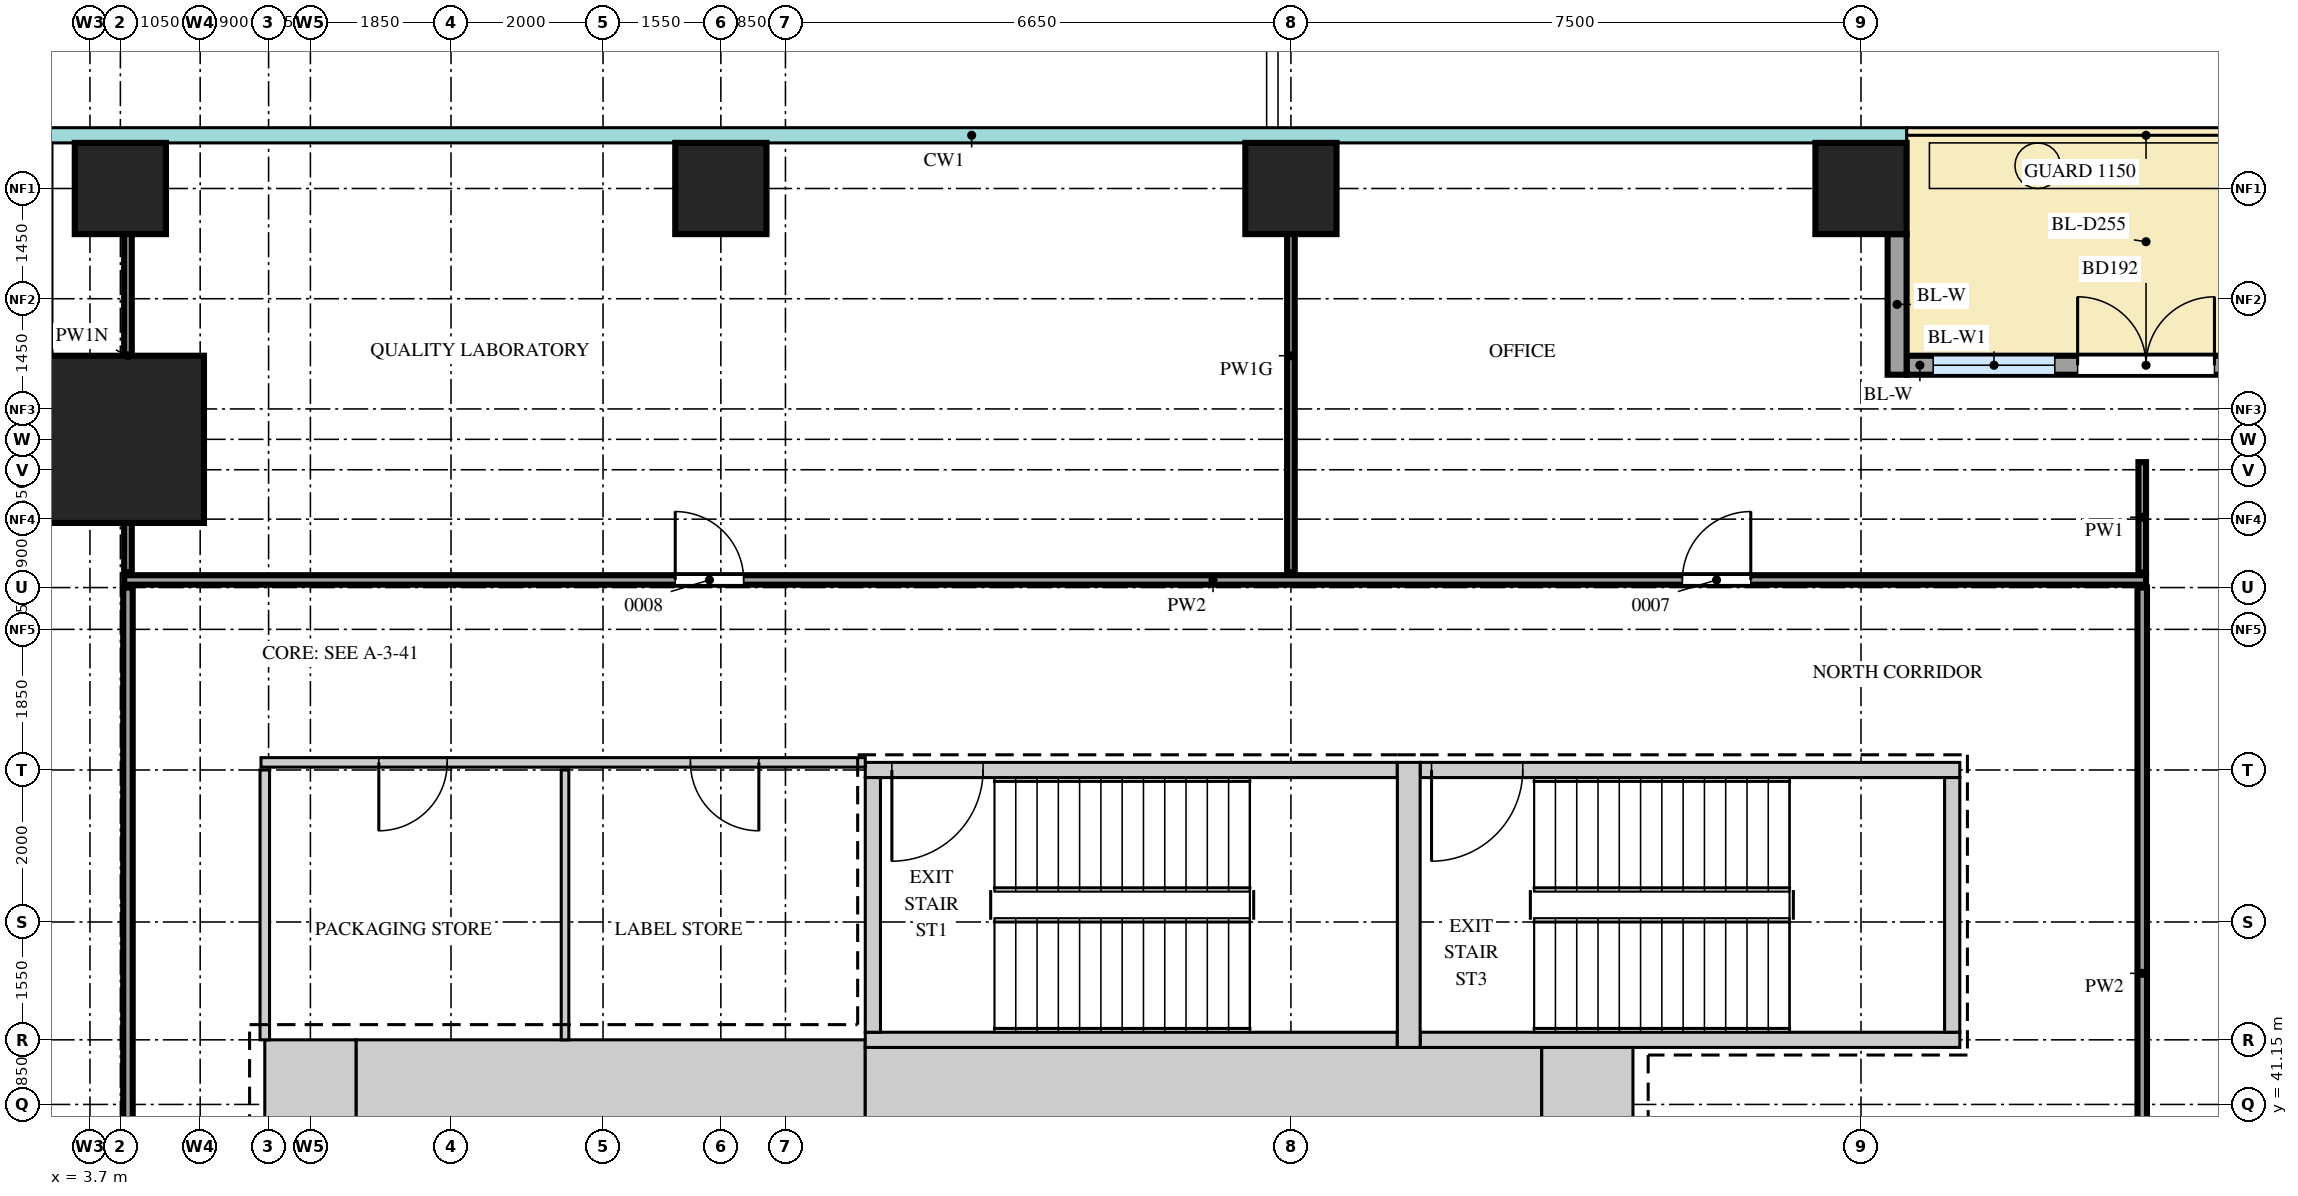
"""IFC4 building model, lengths in metres.
Left out: names, types, materials, properties, quantities, classifications, styles, units other than length and angle.
Written with IfcOpenShell. Run it as: python <this file> out.ifc"""

import sys

from ifc_helpers import new_model, si_unit, direction, frame, frame_2d, origin, origin_2d, place, context, subcontext, project, spatial, rectangle, extrude, source, transform, mapped, element, fill, save


model = new_model("IFC4")
c1 = context("Model", 3, precision=1e-05, world=origin(), true_north=direction((0.0, 1.0)))
c2 = subcontext(c1, "Body", "Model", "MODEL_VIEW")
j1 = project(units=[si_unit("LENGTHUNIT", "METRE"), si_unit("PLANEANGLEUNIT", "RADIAN")], contexts=[c1])
p1 = place(None, origin())
s1 = spatial("IfcSite", under=j1, at=p1, CompositionType="ELEMENT")
p2 = place(p1, origin())
s2 = spatial("IfcBuilding", under=s1, at=p2, CompositionType="ELEMENT")
p3 = place(p2, frame((0.0, 0.0, 91.5)))
s3 = spatial("IfcBuildingStorey", under=s2, at=p3, CompositionType="ELEMENT", Elevation=91.5)
m1 = source(origin(), c2, "Body", "SweptSolid", [
    extrude(rectangle(XDim=6.7, YDim=1.2, at=frame_2d((3.35, 0.0))), origin(), (0.0, 0.0, 1.0), 4.2),
])
p4 = place(p3, frame((7.2, 41.4, 0.0), z_axis=(0.0, 0.0, 1.0), x_axis=(1.0, 0.0, 0.0)))
e1 = element("IfcWall", 1, at=p4, inside=s3, PredefinedType="SHEAR", context=c2, shape_type="MappedRepresentation", body=[
    mapped(m1, transform((0.0, 0.0, 0.0))),
])
m2 = source(origin(), c2, "Body", "SweptSolid", [
    extrude(rectangle(XDim=8.9, YDim=1.1, at=frame_2d((4.45, 0.0))), origin(), (0.0, 0.0, 1.0), 4.2),
])
p5 = place(p3, frame((13.9, 41.35, 0.0), z_axis=(0.0, 0.0, 1.0), x_axis=(1.0, 0.0, 0.0)))
e2 = element("IfcWall", 2, at=p5, inside=s3, PredefinedType="SHEAR", context=c2, shape_type="MappedRepresentation", body=[
    mapped(m2, transform((0.0, 0.0, 0.0))),
])
m3 = source(origin(), c2, "Body", "SweptSolid", [
    extrude(rectangle(XDim=1.2, YDim=1.1, at=frame_2d((0.6, 0.0))), origin(), (0.0, 0.0, 1.0), 4.2),
])
p6 = place(p3, frame((22.8, 41.35, 0.0), z_axis=(0.0, 0.0, 1.0), x_axis=(1.0, 0.0, 0.0)))
e3 = element("IfcWall", 3, at=p6, inside=s3, PredefinedType="SHEAR", context=c2, shape_type="MappedRepresentation", body=[
    mapped(m3, transform((0.0, 0.0, 0.0))),
])
m4 = source(origin(), c2, "Body", "SweptSolid", [
    extrude(rectangle(XDim=1.2, YDim=1.2, at=frame_2d((0.6, 0.0))), origin(), (0.0, 0.0, 1.0), 4.2),
])
p7 = place(p3, frame((6.0, 41.4, 0.0), z_axis=(0.0, 0.0, 1.0), x_axis=(1.0, 0.0, 0.0)))
e4 = element("IfcWall", 4, at=p7, inside=s3, PredefinedType="SHEAR", context=c2, shape_type="MappedRepresentation", body=[
    mapped(m4, transform((0.0, 0.0, 0.0))),
])
m5 = source(origin(), c2, "Body", "SweptSolid", [
    extrude(rectangle(XDim=7.0, YDim=0.2, at=frame_2d((3.5, 0.0))), origin(), (0.0, 0.0, 1.0), 4.2),
])
p8 = place(p3, frame((13.9, 45.55, 0.0), z_axis=(0.0, 0.0, 1.0), x_axis=(1.0, 0.0, 0.0)))
e5 = element("IfcWall", 5, at=p8, inside=s3, PredefinedType="SHEAR", context=c2, shape_type="MappedRepresentation", body=[
    mapped(m5, transform((0.0, 0.0, 0.0))),
])
m6 = source(origin(), c2, "Body", "SweptSolid", [
    extrude(rectangle(XDim=1.2, YDim=2.1, at=frame_2d((0.6, 1.05))), frame((0.0, 0.11, 0.0), z_axis=(0.0, -1.0, 0.0), x_axis=(1.0, 0.0, 0.0)), (0.0, 0.0, 1.0), 0.22),
])
p9 = place(p8, frame((0.35, 0.0, 0.0)))
e6 = element("IfcOpeningElement", 6, at=p9, cuts=e5, PredefinedType="OPENING", context=c2, shape_type="MappedRepresentation", body=[
    mapped(m6, transform((0.0, 0.0, 0.0))),
])
p10 = place(p3, frame((13.9, 42.0, 0.0), z_axis=(0.0, 0.0, 1.0), x_axis=(1.0, 0.0, 0.0)))
e7 = element("IfcWall", 7, at=p10, inside=s3, PredefinedType="SHEAR", context=c2, shape_type="MappedRepresentation", body=[
    mapped(m5, transform((0.0, 0.0, 0.0))),
])
m7 = source(origin(), c2, "Body", "SweptSolid", [
    extrude(rectangle(XDim=7.1, YDim=0.2, at=frame_2d((3.55, 0.0))), origin(), (0.0, 0.0, 1.0), 4.2),
])
p11 = place(p3, frame((21.2, 45.55, 0.0), z_axis=(0.0, 0.0, 1.0), x_axis=(1.0, 0.0, 0.0)))
e8 = element("IfcWall", 8, at=p11, inside=s3, PredefinedType="SHEAR", context=c2, shape_type="MappedRepresentation", body=[
    mapped(m7, transform((0.0, 0.0, 0.0))),
])
p12 = place(p11, frame((0.15, 0.0, 0.0)))
e9 = element("IfcOpeningElement", 9, at=p12, cuts=e8, PredefinedType="OPENING", context=c2, shape_type="MappedRepresentation", body=[
    mapped(m6, transform((0.0, 0.0, 0.0))),
])
p13 = place(p3, frame((21.2, 42.0, 0.0), z_axis=(0.0, 0.0, 1.0), x_axis=(1.0, 0.0, 0.0)))
e10 = element("IfcWall", 10, at=p13, inside=s3, PredefinedType="SHEAR", context=c2, shape_type="MappedRepresentation", body=[
    mapped(m7, transform((0.0, 0.0, 0.0))),
])
m8 = source(origin(), c2, "Body", "SweptSolid", [
    extrude(rectangle(XDim=3.75, YDim=0.3, at=frame_2d((1.875, 0.0))), origin(), (0.0, 0.0, 1.0), 4.2),
])
p14 = place(p3, frame((21.05, 41.9, 0.0), z_axis=(0.0, 0.0, 1.0), x_axis=(0.0, 1.0, 0.0)))
e11 = element("IfcWall", 11, at=p14, inside=s3, PredefinedType="SHEAR", context=c2, shape_type="MappedRepresentation", body=[
    mapped(m8, transform((0.0, 0.0, 0.0))),
])
m9 = source(origin(), c2, "Body", "SweptSolid", [
    extrude(rectangle(XDim=3.35, YDim=0.2, at=frame_2d((1.675, 0.0))), origin(), (0.0, 0.0, 1.0), 4.2),
])
for number, where, z_axis, x_axis in (
    (12, (14.0, 42.1, 0.0), (0.0, 0.0, 1.0), (0.0, 1.0, 0.0)),
    (13, (28.2, 42.1, 0.0), (0.0, 0.0, 1.0), (0.0, 1.0, 0.0)),
):
    element("IfcWall", number, at=place(p3, frame(where, z_axis=z_axis, x_axis=x_axis)), inside=s3, PredefinedType="SHEAR", context=c2, shape_type="MappedRepresentation", body=[
        mapped(m9, transform((0.0, 0.0, 0.0))),
    ])
m10 = source(origin(), c2, "Body", "SweptSolid", [
    extrude(rectangle(XDim=2.2, YDim=2.2, at=origin_2d()), origin(), (0.0, 0.0, 1.0), 4.5),
])
p15 = place(p3, frame((4.1, 49.9, 0.0), z_axis=(0.0, 0.0, 1.0), x_axis=(1.0, 0.0, 0.0)))
e14 = element("IfcColumn", 14, at=p15, inside=s3, PredefinedType="COLUMN", context=c2, shape_type="MappedRepresentation", body=[
    mapped(m10, transform((0.0, 0.0, 0.0))),
])
m11 = source(origin(), c2, "Body", "SweptSolid", [
    extrude(rectangle(XDim=1.2, YDim=1.2, at=origin_2d()), origin(), (0.0, 0.0, 1.0), 4.5),
])
for number, where, z_axis, x_axis in (
    (15, (4.1, 53.2, 0.0), (0.0, 0.0, 1.0), (1.0, 0.0, 0.0)),
    (16, (12.0, 53.2, 0.0), (0.0, 0.0, 1.0), (1.0, 0.0, 0.0)),
    (17, (19.5, 53.2, 0.0), (0.0, 0.0, 1.0), (1.0, 0.0, 0.0)),
    (18, (27.0, 53.2, 0.0), (0.0, 0.0, 1.0), (1.0, 0.0, 0.0)),
):
    element("IfcColumn", number, at=place(p3, frame(where, z_axis=z_axis, x_axis=x_axis)), inside=s3, PredefinedType="COLUMN", context=c2, shape_type="MappedRepresentation", body=[
        mapped(m11, transform((0.0, 0.0, 0.0))),
    ])
m12 = source(origin(), c2, "Body", "SweptSolid", [
    extrude(rectangle(XDim=6.3, YDim=0.25, at=frame_2d((3.15, 0.0))), origin(), (0.0, 0.0, 1.0), 4.2),
])
p16 = place(p3, frame((27.6, 50.875, 0.0), z_axis=(0.0, 0.0, 1.0), x_axis=(1.0, 0.0, 0.0)))
e19 = element("IfcWall", 19, at=p16, inside=s3, PredefinedType="SOLIDWALL", context=c2, shape_type="MappedRepresentation", body=[
    mapped(m12, transform((0.0, 0.0, 0.0))),
])
m13 = source(origin(), c2, "Body", "SweptSolid", [
    extrude(rectangle(XDim=1.6, YDim=2.4, at=frame_2d((0.8, 1.2))), frame((0.0, 0.135, 0.0), z_axis=(0.0, -1.0, 0.0), x_axis=(1.0, 0.0, 0.0)), (0.0, 0.0, 1.0), 0.27),
])
p17 = place(p16, frame((0.35, 0.0, 0.0)))
e20 = element("IfcOpeningElement", 20, at=p17, cuts=e19, PredefinedType="OPENING", context=c2, shape_type="MappedRepresentation", body=[
    mapped(m13, transform((0.0, 0.0, 0.0))),
])
p18 = place(p16, frame((4.35, 0.0, 0.0)))
e21 = element("IfcOpeningElement", 21, at=p18, cuts=e19, PredefinedType="OPENING", context=c2, shape_type="MappedRepresentation", body=[
    mapped(m13, transform((0.0, 0.0, 0.0))),
])
m14 = source(origin(), c2, "Body", "SweptSolid", [
    extrude(rectangle(XDim=1.8, YDim=2.4, at=frame_2d((0.9, 1.2))), frame((0.0, 0.135, 0.0), z_axis=(0.0, -1.0, 0.0), x_axis=(1.0, 0.0, 0.0)), (0.0, 0.0, 1.0), 0.27),
])
p19 = place(p16, frame((2.25, 0.0, 0.0)))
e22 = element("IfcOpeningElement", 22, at=p19, cuts=e19, PredefinedType="OPENING", context=c2, shape_type="MappedRepresentation", body=[
    mapped(m14, transform((0.0, 0.0, 0.0))),
])
m15 = source(origin(), c2, "Body", "SweptSolid", [
    extrude(rectangle(XDim=1.85, YDim=0.25, at=frame_2d((0.925, 0.0))), origin(), (0.0, 0.0, 1.0), 4.2),
])
p20 = place(p3, frame((27.475, 52.6, 0.0), z_axis=(0.0, 0.0, 1.0), x_axis=(0.0, -1.0, 0.0)))
e23 = element("IfcWall", 23, at=p20, inside=s3, PredefinedType="SOLIDWALL", context=c2, shape_type="MappedRepresentation", body=[
    mapped(m15, transform((0.0, 0.0, 0.0))),
])
m16 = source(origin(), c2, "Body", "SweptSolid", [
    extrude(rectangle(XDim=41.8, YDim=0.125, at=frame_2d((20.9, 0.0))), origin(), (0.0, 0.0, 1.0), 4.3),
])
p21 = place(p3, frame((4.2, 6.15, 0.0), z_axis=(0.0, 0.0, 1.0), x_axis=(0.0, 1.0, 0.0)))
e24 = element("IfcWall", 24, at=p21, inside=s3, PredefinedType="PARTITIONING", context=c2, shape_type="MappedRepresentation", body=[
    mapped(m16, transform((0.0, 0.0, 0.0))),
])
m17 = source(origin(), c2, "Body", "SweptSolid", [
    extrude(rectangle(XDim=1.2, YDim=2.1, at=frame_2d((0.6, 1.05))), frame((0.0, 0.073, 0.0), z_axis=(0.0, -1.0, 0.0), x_axis=(1.0, 0.0, 0.0)), (0.0, 0.0, 1.0), 0.145),
])
p22 = place(p21, frame((7.45, 0.0, 0.0)))
e25 = element("IfcOpeningElement", 25, at=p22, cuts=e24, PredefinedType="OPENING", context=c2, shape_type="MappedRepresentation", body=[
    mapped(m17, transform((0.0, 0.0, 0.0))),
])
p23 = place(p21, frame((26.05, 0.0, 0.0)))
e26 = element("IfcOpeningElement", 26, at=p23, cuts=e24, PredefinedType="OPENING", context=c2, shape_type="MappedRepresentation", body=[
    mapped(m17, transform((0.0, 0.0, 0.0))),
])
m18 = source(origin(), c2, "Body", "SweptSolid", [
    extrude(rectangle(XDim=10.15, YDim=0.125, at=frame_2d((5.075, 0.0))), origin(), (0.0, 0.0, 1.0), 4.3),
])
p24 = place(p3, frame((30.7, 37.8, 0.0), z_axis=(0.0, 0.0, 1.0), x_axis=(0.0, 1.0, 0.0)))
e27 = element("IfcWall", 27, at=p24, inside=s3, PredefinedType="PARTITIONING", context=c2, shape_type="MappedRepresentation", body=[
    mapped(m18, transform((0.0, 0.0, 0.0))),
])
m19 = source(origin(), c2, "Body", "SweptSolid", [
    extrude(rectangle(XDim=3.55, YDim=0.125, at=frame_2d((1.775, 0.0))), origin(), (0.0, 0.0, 1.0), 4.3),
])
p25 = place(p3, frame((6.0, 42.0, 0.0), z_axis=(0.0, 0.0, 1.0), x_axis=(0.0, 1.0, 0.0)))
e28 = element("IfcWall", 28, at=p25, inside=s3, PredefinedType="PARTITIONING", context=c2, shape_type="MappedRepresentation", body=[
    mapped(m19, transform((0.0, 0.0, 0.0))),
])
m20 = source(origin(), c2, "Body", "SweptSolid", [
    extrude(rectangle(XDim=3.55, YDim=0.1, at=frame_2d((1.775, 0.0))), origin(), (0.0, 0.0, 1.0), 4.3),
])
p26 = place(p3, frame((9.95, 42.0, 0.0), z_axis=(0.0, 0.0, 1.0), x_axis=(0.0, 1.0, 0.0)))
e29 = element("IfcWall", 29, at=p26, inside=s3, PredefinedType="PARTITIONING", context=c2, shape_type="MappedRepresentation", body=[
    mapped(m20, transform((0.0, 0.0, 0.0))),
])
m21 = source(origin(), c2, "Body", "SweptSolid", [
    extrude(rectangle(XDim=7.95, YDim=0.125, at=frame_2d((3.975, 0.0))), origin(), (0.0, 0.0, 1.0), 4.3),
])
p27 = place(p3, frame((5.95, 45.65, 0.0), z_axis=(0.0, 0.0, 1.0), x_axis=(1.0, 0.0, 0.0)))
e30 = element("IfcWall", 30, at=p27, inside=s3, PredefinedType="PARTITIONING", context=c2, shape_type="MappedRepresentation", body=[
    mapped(m21, transform((0.0, 0.0, 0.0))),
])
m22 = source(origin(), c2, "Body", "SweptSolid", [
    extrude(rectangle(XDim=0.9, YDim=2.1, at=frame_2d((0.45, 1.05))), frame((0.0, 0.073, 0.0), z_axis=(0.0, -1.0, 0.0), x_axis=(1.0, 0.0, 0.0)), (0.0, 0.0, 1.0), 0.145),
])
p28 = place(p27, frame((1.55, 0.0, 0.0)))
e31 = element("IfcOpeningElement", 31, at=p28, cuts=e30, PredefinedType="OPENING", context=c2, shape_type="MappedRepresentation", body=[
    mapped(m22, transform((0.0, 0.0, 0.0))),
])
p29 = place(p27, frame((5.65, 0.0, 0.0)))
e32 = element("IfcOpeningElement", 32, at=p29, cuts=e30, PredefinedType="OPENING", context=c2, shape_type="MappedRepresentation", body=[
    mapped(m22, transform((0.0, 0.0, 0.0))),
])
m23 = source(origin(), c2, "Body", "SweptSolid", [
    extrude(rectangle(XDim=26.6, YDim=0.125, at=frame_2d((13.3, 0.0))), origin(), (0.0, 0.0, 1.0), 4.3),
])
p30 = place(p3, frame((4.15, 48.05, 0.0), z_axis=(0.0, 0.0, 1.0), x_axis=(1.0, 0.0, 0.0)))
e33 = element("IfcWall", 33, at=p30, inside=s3, PredefinedType="PARTITIONING", context=c2, shape_type="MappedRepresentation", body=[
    mapped(m23, transform((0.0, 0.0, 0.0))),
])
p31 = place(p30, frame((7.25, 0.0, 0.0)))
e34 = element("IfcOpeningElement", 34, at=p31, cuts=e33, PredefinedType="OPENING", context=c2, shape_type="MappedRepresentation", body=[
    mapped(m22, transform((0.0, 0.0, 0.0))),
])
p32 = place(p30, frame((20.5, 0.0, 0.0)))
e35 = element("IfcOpeningElement", 35, at=p32, cuts=e33, PredefinedType="OPENING", context=c2, shape_type="MappedRepresentation", body=[
    mapped(m22, transform((0.0, 0.0, 0.0))),
])
m24 = source(origin(), c2, "Body", "SweptSolid", [
    extrude(rectangle(XDim=5.7, YDim=0.1, at=frame_2d((2.85, 0.0))), origin(), (0.0, 0.0, 1.0), 3.5),
])
p33 = place(p3, frame((4.2, 48.15, 0.0), z_axis=(0.0, 0.0, 1.0), x_axis=(0.0, 1.0, 0.0)))
e36 = element("IfcWall", 36, at=p33, inside=s3, PredefinedType="PARTITIONING", context=c2, shape_type="MappedRepresentation", body=[
    mapped(m24, transform((0.0, 0.0, 0.0))),
])
m25 = source(origin(), c2, "Body", "SweptSolid", [
    extrude(rectangle(XDim=5.7, YDim=0.1, at=frame_2d((2.85, 0.0))), origin(), (0.0, 0.0, 1.0), 3.74),
])
p34 = place(p3, frame((19.5, 48.15, 0.0), z_axis=(0.0, 0.0, 1.0), x_axis=(0.0, 1.0, 0.0)))
e37 = element("IfcWall", 37, at=p34, inside=s3, PredefinedType="PARTITIONING", context=c2, shape_type="MappedRepresentation", body=[
    mapped(m25, transform((0.0, 0.0, 0.0))),
])
m26 = source(origin(), c2, "Body", "SweptSolid", [
    extrude(rectangle(XDim=1.45, YDim=0.1, at=frame_2d((0.725, 0.0))), origin(), (0.0, 0.0, 1.0), 4.3),
])
p35 = place(p3, frame((30.7, 48.15, 0.0), z_axis=(0.0, 0.0, 1.0), x_axis=(0.0, 1.0, 0.0)))
e38 = element("IfcWall", 38, at=p35, inside=s3, PredefinedType="PARTITIONING", context=c2, shape_type="MappedRepresentation", body=[
    mapped(m26, transform((0.0, 0.0, 0.0))),
])
m27 = source(origin(), c2, "Body", "SweptSolid", [
    extrude(rectangle(XDim=1.6, YDim=2.4, at=frame_2d((0.8, 1.2))), frame((0.0, 0.03, 0.0), z_axis=(0.0, -1.0, 0.0), x_axis=(1.0, 0.0, 0.0)), (0.0, 0.0, 1.0), 0.06),
])
p36 = place(p17, origin())
e39 = element("IfcWindow", 39, at=p36, inside=s3, PartitioningType="SINGLE_PANEL", PredefinedType="WINDOW", context=c2, shape_type="MappedRepresentation", body=[
    mapped(m27, transform((0.0, 0.0, 0.0))),
])
fill(e20, e39)
m28 = source(origin(), c2, "Body", "SweptSolid", [
    extrude(rectangle(XDim=1.8, YDim=2.4, at=frame_2d((0.9, 1.2))), frame((0.0, 0.025, 0.0), z_axis=(0.0, -1.0, 0.0), x_axis=(1.0, 0.0, 0.0)), (0.0, 0.0, 1.0), 0.05),
])
p37 = place(p19, origin())
e40 = element("IfcDoor", 40, at=p37, inside=s3, OperationType="DOUBLE_DOOR_DOUBLE_SWING", PredefinedType="DOOR", context=c2, shape_type="MappedRepresentation", body=[
    mapped(m28, transform((0.0, 0.0, 0.0))),
])
fill(e22, e40)
m29 = source(origin(), c2, "Body", "SweptSolid", [
    extrude(rectangle(XDim=0.9, YDim=2.1, at=frame_2d((0.45, 1.05))), frame((0.0, 0.025, 0.0), z_axis=(0.0, -1.0, 0.0), x_axis=(1.0, 0.0, 0.0)), (0.0, 0.0, 1.0), 0.05),
])
p38 = place(p31, origin())
e41 = element("IfcDoor", 41, at=p38, inside=s3, OperationType="SINGLE_SWING_RIGHT", PredefinedType="DOOR", context=c2, shape_type="MappedRepresentation", body=[
    mapped(m29, transform((0.0, 0.0, 0.0))),
])
fill(e34, e41)
p39 = place(p32, origin())
e42 = element("IfcDoor", 42, at=p39, inside=s3, OperationType="SINGLE_SWING_LEFT", PredefinedType="DOOR", context=c2, shape_type="MappedRepresentation", body=[
    mapped(m29, transform((0.0, 0.0, 0.0))),
])
fill(e35, e42)
p40 = place(p28, origin())
e43 = element("IfcDoor", 43, at=p40, inside=s3, OperationType="SINGLE_SWING_LEFT", PredefinedType="DOOR", context=c2, shape_type="MappedRepresentation", body=[
    mapped(m29, transform((0.0, 0.0, 0.0))),
])
fill(e31, e43)
p41 = place(p29, origin())
e44 = element("IfcDoor", 44, at=p41, inside=s3, OperationType="SINGLE_SWING_RIGHT", PredefinedType="DOOR", context=c2, shape_type="MappedRepresentation", body=[
    mapped(m29, transform((0.0, 0.0, 0.0))),
])
fill(e32, e44)
m30 = source(origin(), c2, "Body", "SweptSolid", [
    extrude(rectangle(XDim=1.2, YDim=2.1, at=frame_2d((0.6, 1.05))), frame((0.0, 0.025, 0.0), z_axis=(0.0, -1.0, 0.0), x_axis=(1.0, 0.0, 0.0)), (0.0, 0.0, 1.0), 0.05),
])
p42 = place(p9, origin())
e45 = element("IfcDoor", 45, at=p42, inside=s3, OperationType="SINGLE_SWING_LEFT", PredefinedType="DOOR", context=c2, shape_type="MappedRepresentation", body=[
    mapped(m30, transform((0.0, 0.0, 0.0))),
])
fill(e6, e45)
p43 = place(p12, origin())
e46 = element("IfcDoor", 46, at=p43, inside=s3, OperationType="SINGLE_SWING_LEFT", PredefinedType="DOOR", context=c2, shape_type="MappedRepresentation", body=[
    mapped(m30, transform((0.0, 0.0, 0.0))),
])
fill(e9, e46)
save(model, sys.argv[1])
